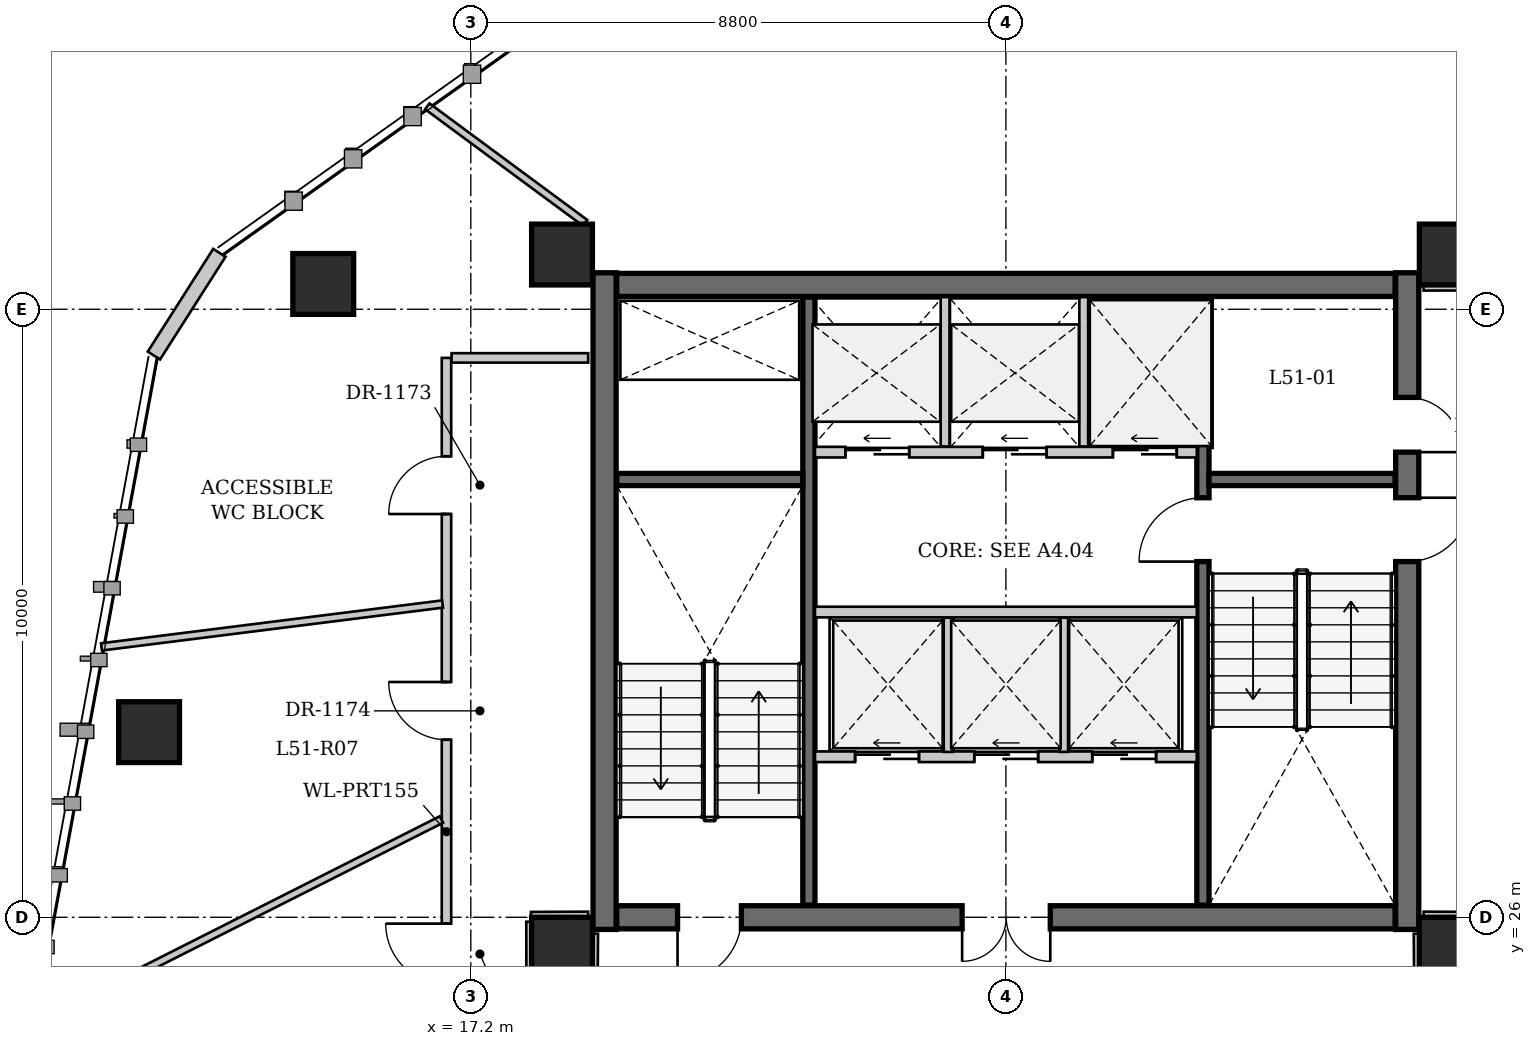
"""IFC4 building model, lengths in metres.
Left out: names, types, materials, properties, quantities, classifications, styles, units other than length and angle.
Written with IfcOpenShell. Run it as: python <this file> out.ifc"""

import sys

from ifc_helpers import new_model, si_unit, direction, frame, frame_2d, origin, origin_2d, place, context, subcontext, project, spatial, rectangle, extrude, source, transform, mapped, element, fill, save


model = new_model("IFC4")
c1 = context("Model", 3, precision=1e-05, world=origin(), true_north=direction((0.0, 1.0)))
c2 = subcontext(c1, "Body", "Model", "MODEL_VIEW")
j1 = project(units=[si_unit("LENGTHUNIT", "METRE"), si_unit("PLANEANGLEUNIT", "RADIAN")], contexts=[c1])
p1 = place(None, origin())
s1 = spatial("IfcSite", under=j1, at=p1, CompositionType="ELEMENT")
p2 = place(p1, origin())
s2 = spatial("IfcBuilding", under=s1, at=p2, CompositionType="ELEMENT")
p3 = place(p2, frame((0.0, 0.0, 195.0)))
s3 = spatial("IfcBuildingStorey", under=s2, at=p3, CompositionType="ELEMENT", Elevation=195.0)
for number, where, z_axis, x_axis in (
    (1, (11.909, 29.045, 0.0), (0.0, 0.0, 1.0), (1.0, 0.0, 0.0)),
    (2, (14.773, 36.416, 0.0), (0.0, 0.0, 1.0), (1.0, 0.0, 0.0)),
    (3, (18.7, 25.5, 0.0), (0.0, 0.0, 1.0), (1.0, 0.0, 0.0)),
    (4, (33.3, 25.5, 0.0), (0.0, 0.0, 1.0), (1.0, 0.0, 0.0)),
    (5, (33.3, 36.9, 0.0), (0.0, 0.0, 1.0), (1.0, 0.0, 0.0)),
    (6, (18.7, 36.9, 0.0), (0.0, 0.0, 1.0), (1.0, 0.0, 0.0)),
):
    element("IfcColumn", number, at=place(p3, frame(where, z_axis=z_axis, x_axis=x_axis)), inside=s3, PredefinedType="COLUMN", context=c2, shape_type="SweptSolid", body=[
        extrude(rectangle(XDim=1.0, YDim=1.0, at=origin_2d()), origin(), (0.0, 0.0, 1.0), 3.23),
    ])
p4 = place(p3, frame((11.989, 35.239, 0.0), z_axis=(0.0, 0.0, 1.0), x_axis=(0.537395915449, 0.843330083691, 0.0)))
e7 = element("IfcWall", 7, at=p4, inside=s3, PredefinedType="SOLIDWALL", context=c2, shape_type="SweptSolid", body=[
    extrude(rectangle(XDim=2.003, YDim=0.24, at=frame_2d((1.001, 0.0))), origin(), (0.0, 0.0, 1.0), 3.23),
])
p5 = place(p3, frame((19.4, 25.8, 0.0), z_axis=(0.0, 0.0, 1.0), x_axis=(0.0, 1.0, 0.0)))
e8 = element("IfcWall", 8, at=p5, inside=s3, PredefinedType="SHEAR", context=c2, shape_type="SweptSolid", body=[
    extrude(rectangle(XDim=10.8, YDim=0.38, at=frame_2d((5.4, 0.0))), origin(), (0.0, 0.0, 1.0), 3.5),
])
p6 = place(p3, frame((32.6, 36.6, 0.0), z_axis=(0.0, 0.0, 1.0), x_axis=(0.0, -1.0, 0.0)))
e9 = element("IfcWall", 9, at=p6, inside=s3, PredefinedType="SHEAR", context=c2, shape_type="SweptSolid", body=[
    extrude(rectangle(XDim=10.8, YDim=0.38, at=frame_2d((5.4, 0.0))), origin(), (0.0, 0.0, 1.0), 3.5),
])
p7 = place(p6, frame((3.7, 0.0, 0.0)))
e10 = element("IfcOpeningElement", 10, at=p7, cuts=e9, PredefinedType="OPENING", context=c2, shape_type="SweptSolid", body=[
    extrude(rectangle(XDim=1.05, YDim=2.15, at=frame_2d((0.525, 1.075))), frame((0.0, 0.2, 0.0), z_axis=(0.0, -1.0, 0.0), x_axis=(1.0, 0.0, 0.0)), (0.0, 0.0, 1.0), 0.4),
])
p8 = place(p6, frame((2.05, 0.0, 0.0)))
e11 = element("IfcOpeningElement", 11, at=p8, cuts=e9, PredefinedType="OPENING", context=c2, shape_type="SweptSolid", body=[
    extrude(rectangle(XDim=0.9, YDim=2.1, at=frame_2d((0.45, 1.05))), frame((0.0, 0.2, 0.0), z_axis=(0.0, -1.0, 0.0), x_axis=(1.0, 0.0, 0.0)), (0.0, 0.0, 1.0), 0.4),
])
p9 = place(p3, frame((19.6, 36.4, 0.0), z_axis=(0.0, 0.0, 1.0), x_axis=(1.0, 0.0, 0.0)))
e12 = element("IfcWall", 12, at=p9, inside=s3, PredefinedType="SHEAR", context=c2, shape_type="SweptSolid", body=[
    extrude(rectangle(XDim=12.8, YDim=0.38, at=frame_2d((6.4, 0.0))), origin(), (0.0, 0.0, 1.0), 3.5),
])
p10 = place(p3, frame((32.4, 26.0, 0.0), z_axis=(0.0, 0.0, 1.0), x_axis=(-1.0, 0.0, 0.0)))
e13 = element("IfcWall", 13, at=p10, inside=s3, PredefinedType="SHEAR", context=c2, shape_type="SweptSolid", body=[
    extrude(rectangle(XDim=12.8, YDim=0.38, at=frame_2d((6.4, 0.0))), origin(), (0.0, 0.0, 1.0), 3.5),
])
p11 = place(p10, frame((10.75, 0.0, 0.0)))
e14 = element("IfcOpeningElement", 14, at=p11, cuts=e13, PredefinedType="OPENING", context=c2, shape_type="SweptSolid", body=[
    extrude(rectangle(XDim=1.05, YDim=2.15, at=frame_2d((0.525, 1.075))), frame((0.0, 0.2, 0.0), z_axis=(0.0, -1.0, 0.0), x_axis=(1.0, 0.0, 0.0)), (0.0, 0.0, 1.0), 0.4),
])
p12 = place(p10, frame((5.67, 0.0, 0.0)))
e15 = element("IfcOpeningElement", 15, at=p12, cuts=e13, PredefinedType="OPENING", context=c2, shape_type="SweptSolid", body=[
    extrude(rectangle(XDim=1.45, YDim=2.2, at=frame_2d((0.725, 1.1))), frame((0.0, 0.2, 0.0), z_axis=(0.0, -1.0, 0.0), x_axis=(1.0, 0.0, 0.0)), (0.0, 0.0, 1.0), 0.4),
])
p13 = place(p3, frame((22.76, 26.2, 0.0), z_axis=(0.0, 0.0, 1.0), x_axis=(0.0, 1.0, 0.0)))
e16 = element("IfcWall", 16, at=p13, inside=s3, PredefinedType="SHEAR", context=c2, shape_type="SweptSolid", body=[
    extrude(rectangle(XDim=10.0, YDim=0.2, at=frame_2d((5.0, 0.0))), origin(), (0.0, 0.0, 1.0), 3.5),
])
p14 = place(p3, frame((29.24, 26.2, 0.0), z_axis=(0.0, 0.0, 1.0), x_axis=(0.0, 1.0, 0.0)))
e17 = element("IfcWall", 17, at=p14, inside=s3, PredefinedType="SHEAR", context=c2, shape_type="SweptSolid", body=[
    extrude(rectangle(XDim=10.0, YDim=0.2, at=frame_2d((5.0, 0.0))), origin(), (0.0, 0.0, 1.0), 3.5),
])
p15 = place(p14, frame((5.65, 0.0, 0.0)))
e18 = element("IfcOpeningElement", 18, at=p15, cuts=e17, PredefinedType="OPENING", context=c2, shape_type="SweptSolid", body=[
    extrude(rectangle(XDim=1.05, YDim=2.15, at=frame_2d((0.525, 1.075))), frame((0.0, 0.11, 0.0), z_axis=(0.0, -1.0, 0.0), x_axis=(1.0, 0.0, 0.0)), (0.0, 0.0, 1.0), 0.22),
])
for number, where, z_axis, x_axis in (
    (19, (19.6, 33.2, 0.0), (0.0, 0.0, 1.0), (1.0, 0.0, 0.0)),
    (20, (29.34, 33.2, 0.0), (0.0, 0.0, 1.0), (1.0, 0.0, 0.0)),
):
    element("IfcWall", number, at=place(p3, frame(where, z_axis=z_axis, x_axis=x_axis)), inside=s3, PredefinedType="SHEAR", context=c2, shape_type="SweptSolid", body=[
        extrude(rectangle(XDim=3.06, YDim=0.2, at=frame_2d((1.53, 0.0))), origin(), (0.0, 0.0, 1.0), 3.5),
    ])
p16 = place(p3, frame((22.86, 33.65, 0.0), z_axis=(0.0, 0.0, 1.0), x_axis=(1.0, 0.0, 0.0)))
e21 = element("IfcWall", 21, at=p16, inside=s3, PredefinedType="SOLIDWALL", context=c2, shape_type="SweptSolid", body=[
    extrude(rectangle(XDim=6.28, YDim=0.175, at=frame_2d((3.14, 0.0))), origin(), (0.0, 0.0, 1.0), 3.23),
])
p17 = place(p16, frame((0.5, 0.0, 0.0)))
e22 = element("IfcOpeningElement", 22, at=p17, cuts=e21, PredefinedType="OPENING", context=c2, shape_type="SweptSolid", body=[
    extrude(rectangle(XDim=1.05, YDim=2.15, at=frame_2d((0.525, 1.075))), frame((0.0, 0.098, 0.0), z_axis=(0.0, -1.0, 0.0), x_axis=(1.0, 0.0, 0.0)), (0.0, 0.0, 1.0), 0.195),
])
p18 = place(p16, frame((2.76, 0.0, 0.0)))
e23 = element("IfcOpeningElement", 23, at=p18, cuts=e21, PredefinedType="OPENING", context=c2, shape_type="SweptSolid", body=[
    extrude(rectangle(XDim=1.05, YDim=2.15, at=frame_2d((0.525, 1.075))), frame((0.0, 0.098, 0.0), z_axis=(0.0, -1.0, 0.0), x_axis=(1.0, 0.0, 0.0)), (0.0, 0.0, 1.0), 0.195),
])
p19 = place(p16, frame((4.9, 0.0, 0.0)))
e24 = element("IfcOpeningElement", 24, at=p19, cuts=e21, PredefinedType="OPENING", context=c2, shape_type="SweptSolid", body=[
    extrude(rectangle(XDim=1.05, YDim=2.15, at=frame_2d((0.525, 1.075))), frame((0.0, 0.098, 0.0), z_axis=(0.0, -1.0, 0.0), x_axis=(1.0, 0.0, 0.0)), (0.0, 0.0, 1.0), 0.195),
])
for number, where, z_axis, x_axis in (
    (25, (25.0, 33.743, 0.0), (0.0, 0.0, 1.0), (0.0, 1.0, 0.0)),
    (26, (27.28, 33.743, 0.0), (0.0, 0.0, 1.0), (0.0, 1.0, 0.0)),
):
    element("IfcWall", number, at=place(p3, frame(where, z_axis=z_axis, x_axis=x_axis)), inside=s3, PredefinedType="SOLIDWALL", context=c2, shape_type="SweptSolid", body=[
        extrude(rectangle(XDim=2.457, YDim=0.145, at=frame_2d((1.228, 0.0))), origin(), (0.0, 0.0, 1.0), 3.23),
    ])
p20 = place(p3, frame((22.86, 31.02, 0.0), z_axis=(0.0, 0.0, 1.0), x_axis=(1.0, 0.0, 0.0)))
e27 = element("IfcWall", 27, at=p20, inside=s3, PredefinedType="SOLIDWALL", context=c2, shape_type="SweptSolid", body=[
    extrude(rectangle(XDim=6.28, YDim=0.175, at=frame_2d((3.14, 0.0))), origin(), (0.0, 0.0, 1.0), 3.23),
])
p21 = place(p3, frame((22.86, 28.64, 0.0), z_axis=(0.0, 0.0, 1.0), x_axis=(1.0, 0.0, 0.0)))
e28 = element("IfcWall", 28, at=p21, inside=s3, PredefinedType="SOLIDWALL", context=c2, shape_type="SweptSolid", body=[
    extrude(rectangle(XDim=6.28, YDim=0.175, at=frame_2d((3.14, 0.0))), origin(), (0.0, 0.0, 1.0), 3.23),
])
p22 = place(p21, frame((0.66, 0.0, 0.0)))
e29 = element("IfcOpeningElement", 29, at=p22, cuts=e28, PredefinedType="OPENING", context=c2, shape_type="SweptSolid", body=[
    extrude(rectangle(XDim=1.05, YDim=2.15, at=frame_2d((0.525, 1.075))), frame((0.0, 0.098, 0.0), z_axis=(0.0, -1.0, 0.0), x_axis=(1.0, 0.0, 0.0)), (0.0, 0.0, 1.0), 0.195),
])
p23 = place(p21, frame((2.62, 0.0, 0.0)))
e30 = element("IfcOpeningElement", 30, at=p23, cuts=e28, PredefinedType="OPENING", context=c2, shape_type="SweptSolid", body=[
    extrude(rectangle(XDim=1.05, YDim=2.15, at=frame_2d((0.525, 1.075))), frame((0.0, 0.098, 0.0), z_axis=(0.0, -1.0, 0.0), x_axis=(1.0, 0.0, 0.0)), (0.0, 0.0, 1.0), 0.195),
])
p24 = place(p21, frame((4.56, 0.0, 0.0)))
e31 = element("IfcOpeningElement", 31, at=p24, cuts=e28, PredefinedType="OPENING", context=c2, shape_type="SweptSolid", body=[
    extrude(rectangle(XDim=1.05, YDim=2.15, at=frame_2d((0.525, 1.075))), frame((0.0, 0.098, 0.0), z_axis=(0.0, -1.0, 0.0), x_axis=(1.0, 0.0, 0.0)), (0.0, 0.0, 1.0), 0.195),
])
for number, where, z_axis, x_axis in (
    (32, (25.05, 28.72, 0.0), (0.0, 0.0, 1.0), (0.0, 1.0, 0.0)),
    (33, (26.95, 28.72, 0.0), (0.0, 0.0, 1.0), (0.0, 1.0, 0.0)),
):
    element("IfcWall", number, at=place(p3, frame(where, z_axis=z_axis, x_axis=x_axis)), inside=s3, PredefinedType="SOLIDWALL", context=c2, shape_type="SweptSolid", body=[
        extrude(rectangle(XDim=2.207, YDim=0.145, at=frame_2d((1.103, 0.0))), origin(), (0.0, 0.0, 1.0), 3.23),
    ])
p25 = place(p3, frame((16.8, 23.0, 0.0), z_axis=(0.0, 0.0, 1.0), x_axis=(0.0, 1.0, 0.0)))
e34 = element("IfcWall", 34, at=p25, inside=s3, PredefinedType="PARTITIONING", context=c2, shape_type="SweptSolid", body=[
    extrude(rectangle(XDim=12.2, YDim=0.155, at=frame_2d((6.1, 0.0))), origin(), (0.0, 0.0, 1.0), 3.23),
])
p26 = place(p25, frame((1.896, 0.0, 0.0)))
e35 = element("IfcOpeningElement", 35, at=p26, cuts=e34, PredefinedType="OPENING", context=c2, shape_type="SweptSolid", body=[
    extrude(rectangle(XDim=1.0, YDim=2.15, at=frame_2d((0.5, 1.075))), frame((0.0, 0.087, 0.0), z_axis=(0.0, -1.0, 0.0), x_axis=(1.0, 0.0, 0.0)), (0.0, 0.0, 1.0), 0.175),
])
p27 = place(p25, frame((9.632, 0.0, 0.0)))
e36 = element("IfcOpeningElement", 36, at=p27, cuts=e34, PredefinedType="OPENING", context=c2, shape_type="SweptSolid", body=[
    extrude(rectangle(XDim=0.95, YDim=2.15, at=frame_2d((0.475, 1.075))), frame((0.0, 0.087, 0.0), z_axis=(0.0, -1.0, 0.0), x_axis=(1.0, 0.0, 0.0)), (0.0, 0.0, 1.0), 0.175),
])
p28 = place(p25, frame((5.92, 0.0, 0.0)))
e37 = element("IfcOpeningElement", 37, at=p28, cuts=e34, PredefinedType="OPENING", context=c2, shape_type="SweptSolid", body=[
    extrude(rectangle(XDim=0.95, YDim=2.15, at=frame_2d((0.475, 1.075))), frame((0.0, 0.087, 0.0), z_axis=(0.0, -1.0, 0.0), x_axis=(1.0, 0.0, 0.0)), (0.0, 0.0, 1.0), 0.175),
])
p29 = place(p3, frame((16.884, 35.2, 0.0), z_axis=(0.0, 0.0, 1.0), x_axis=(1.0, 0.0, 0.0)))
e38 = element("IfcWall", 38, at=p29, inside=s3, PredefinedType="PARTITIONING", context=c2, shape_type="SweptSolid", body=[
    extrude(rectangle(XDim=2.246, YDim=0.155, at=frame_2d((1.123, 0.0))), origin(), (0.0, 0.0, 1.0), 3.23),
])
p30 = place(p3, frame((19.13, 26.015, 0.0), z_axis=(0.0, 0.0, 1.0), x_axis=(-0.99999026157, -0.004413248818, 0.0)))
e39 = element("IfcWall", 39, at=p30, inside=s3, PredefinedType="PARTITIONING", context=c2, shape_type="SweptSolid", body=[
    extrude(rectangle(XDim=0.94, YDim=0.155, at=frame_2d((0.47, 0.0))), origin(), (0.0, 0.0, 1.0), 3.23),
])
p31 = place(p3, frame((18.19, 25.927, 0.0), z_axis=(0.0, 0.0, 1.0), x_axis=(0.002078997586, -0.999997838882, 0.0)))
e40 = element("IfcWall", 40, at=p31, inside=s3, PredefinedType="PARTITIONING", context=c2, shape_type="SweptSolid", body=[
    extrude(rectangle(XDim=0.939, YDim=0.155, at=frame_2d((0.47, 0.0))), origin(), (0.0, 0.0, 1.0), 3.23),
])
p32 = place(p3, frame((19.21, 25.072, 0.0), z_axis=(0.0, 0.0, 1.0), x_axis=(0.007420945932, 0.999972464402, 0.0)))
e41 = element("IfcWall", 41, at=p32, inside=s3, PredefinedType="PARTITIONING", context=c2, shape_type="SweptSolid", body=[
    extrude(rectangle(XDim=0.658, YDim=0.155, at=frame_2d((0.329, 0.0))), origin(), (0.0, 0.0, 1.0), 3.23),
])
p33 = place(p3, frame((32.785, 25.73, 0.0), z_axis=(0.0, 0.0, 1.0), x_axis=(0.007570553288, -0.999971342951, 0.0)))
e42 = element("IfcWall", 42, at=p33, inside=s3, PredefinedType="PARTITIONING", context=c2, shape_type="SweptSolid", body=[
    extrude(rectangle(XDim=0.742, YDim=0.155, at=frame_2d((0.371, 0.0))), origin(), (0.0, 0.0, 1.0), 3.23),
])
p34 = place(p3, frame((33.727, 26.011, 0.0), z_axis=(0.0, 0.0, 1.0), x_axis=(-0.999990868706, 0.004273465251, 0.0)))
e43 = element("IfcWall", 43, at=p34, inside=s3, PredefinedType="PARTITIONING", context=c2, shape_type="SweptSolid", body=[
    extrude(rectangle(XDim=0.857, YDim=0.155, at=frame_2d((0.428, 0.0))), origin(), (0.0, 0.0, 1.0), 3.23),
])
p35 = place(p3, frame((32.87, 36.385, 0.0), z_axis=(0.0, 0.0, 1.0), x_axis=(0.999999965754, 0.000261711585, 0.0)))
e44 = element("IfcWall", 44, at=p35, inside=s3, PredefinedType="PARTITIONING", context=c2, shape_type="SweptSolid", body=[
    extrude(rectangle(XDim=0.933, YDim=0.155, at=frame_2d((0.466, 0.0))), origin(), (0.0, 0.0, 1.0), 3.23),
])
p36 = place(p3, frame((9.972, 24.2, 0.0), z_axis=(0.0, 0.0, 1.0), x_axis=(0.892532461232, 0.450983154504, 0.0)))
e45 = element("IfcWall", 45, at=p36, inside=s3, PredefinedType="PARTITIONING", context=c2, shape_type="SweptSolid", body=[
    extrude(rectangle(XDim=7.557, YDim=0.12, at=frame_2d((3.778, 0.0))), origin(), (0.0, 0.0, 1.0), 3.23),
])
p37 = place(p3, frame((19.08, 37.42, 0.0), z_axis=(0.0, 0.0, 1.0), x_axis=(-0.80430976954, 0.594210227633, 0.0)))
e46 = element("IfcWall", 46, at=p37, inside=s3, PredefinedType="PARTITIONING", context=c2, shape_type="SweptSolid", body=[
    extrude(rectangle(XDim=3.227, YDim=0.12, at=frame_2d((1.614, 0.0))), origin(), (0.0, 0.0, 1.0), 3.23),
])
p38 = place(p3, frame((16.736, 31.152, 0.0), z_axis=(0.0, 0.0, 1.0), x_axis=(-0.992197947241, -0.124672504948, 0.0)))
e47 = element("IfcWall", 47, at=p38, inside=s3, PredefinedType="PARTITIONING", context=c2, shape_type="SweptSolid", body=[
    extrude(rectangle(XDim=5.654, YDim=0.12, at=frame_2d((2.827, 0.0))), origin(), (0.0, 0.0, 1.0), 3.23),
])
m1 = source(origin(), c2, "Body", "SweptSolid", [
    extrude(rectangle(XDim=1.05, YDim=2.15, at=frame_2d((0.525, 1.075))), frame((0.0, 0.025, 0.0), z_axis=(0.0, -1.0, 0.0), x_axis=(1.0, 0.0, 0.0)), (0.0, 0.0, 1.0), 0.05),
])
p39 = place(p11, origin())
e48 = element("IfcDoor", 48, at=p39, inside=s3, OperationType="SINGLE_SWING_RIGHT", PredefinedType="DOOR", context=c2, shape_type="MappedRepresentation", body=[
    mapped(m1, transform((0.0, 0.0, 0.0), x_axis=(1.0, 0.0, 0.0), y_axis=(0.0, 1.0, 0.0), z_axis=(0.0, 0.0, 1.0), scale=1.0)),
])
fill(e14, e48)
m2 = source(origin(), c2, "Body", "SweptSolid", [
    extrude(rectangle(XDim=1.45, YDim=2.2, at=frame_2d((0.725, 1.1))), frame((0.0, 0.025, 0.0), z_axis=(0.0, -1.0, 0.0), x_axis=(1.0, 0.0, 0.0)), (0.0, 0.0, 1.0), 0.05),
])
p40 = place(p12, origin())
e49 = element("IfcDoor", 49, at=p40, inside=s3, OperationType="DOUBLE_DOOR_SINGLE_SWING", PredefinedType="DOOR", context=c2, shape_type="MappedRepresentation", body=[
    mapped(m2, transform((0.0, 0.0, 0.0), x_axis=(1.0, 0.0, 0.0), y_axis=(0.0, 1.0, 0.0), z_axis=(0.0, 0.0, 1.0), scale=1.0)),
])
fill(e15, e49)
p41 = place(p7, origin())
e50 = element("IfcDoor", 50, at=p41, inside=s3, OperationType="SINGLE_SWING_LEFT", PredefinedType="DOOR", context=c2, shape_type="MappedRepresentation", body=[
    mapped(m1, transform((0.0, 0.0, 0.0), x_axis=(1.0, 0.0, 0.0), y_axis=(0.0, 1.0, 0.0), z_axis=(0.0, 0.0, 1.0), scale=1.0)),
])
fill(e10, e50)
p42 = place(p15, origin())
e51 = element("IfcDoor", 51, at=p42, inside=s3, OperationType="SINGLE_SWING_LEFT", PredefinedType="DOOR", context=c2, shape_type="MappedRepresentation", body=[
    mapped(m1, transform((0.0, 0.0, 0.0), x_axis=(1.0, 0.0, 0.0), y_axis=(0.0, 1.0, 0.0), z_axis=(0.0, 0.0, 1.0), scale=1.0)),
])
fill(e18, e51)
m3 = source(origin(), c2, "Body", "SweptSolid", [
    extrude(rectangle(XDim=1.05, YDim=2.15, at=frame_2d((0.525, 1.075))), frame((0.0, 0.025, 0.0), z_axis=(0.0, -1.0, 0.0), x_axis=(1.0, 0.0, 0.0)), (0.0, 0.0, 1.0), 0.05),
])
p43 = place(p17, origin())
e52 = element("IfcDoor", 52, at=p43, inside=s3, OperationType="SLIDING_TO_LEFT", PredefinedType="DOOR", context=c2, shape_type="MappedRepresentation", body=[
    mapped(m3, transform((0.0, 0.0, 0.0), x_axis=(1.0, 0.0, 0.0), y_axis=(0.0, 1.0, 0.0), z_axis=(0.0, 0.0, 1.0), scale=1.0)),
])
fill(e22, e52)
p44 = place(p18, origin())
e53 = element("IfcDoor", 53, at=p44, inside=s3, OperationType="SLIDING_TO_LEFT", PredefinedType="DOOR", context=c2, shape_type="MappedRepresentation", body=[
    mapped(m3, transform((0.0, 0.0, 0.0), x_axis=(1.0, 0.0, 0.0), y_axis=(0.0, 1.0, 0.0), z_axis=(0.0, 0.0, 1.0), scale=1.0)),
])
fill(e23, e53)
p45 = place(p19, origin())
e54 = element("IfcDoor", 54, at=p45, inside=s3, OperationType="SLIDING_TO_LEFT", PredefinedType="DOOR", context=c2, shape_type="MappedRepresentation", body=[
    mapped(m3, transform((0.0, 0.0, 0.0), x_axis=(1.0, 0.0, 0.0), y_axis=(0.0, 1.0, 0.0), z_axis=(0.0, 0.0, 1.0), scale=1.0)),
])
fill(e24, e54)
p46 = place(p22, origin())
e55 = element("IfcDoor", 55, at=p46, inside=s3, OperationType="SLIDING_TO_LEFT", PredefinedType="DOOR", context=c2, shape_type="MappedRepresentation", body=[
    mapped(m3, transform((0.0, 0.0, 0.0), x_axis=(1.0, 0.0, 0.0), y_axis=(0.0, 1.0, 0.0), z_axis=(0.0, 0.0, 1.0), scale=1.0)),
])
fill(e29, e55)
p47 = place(p23, origin())
e56 = element("IfcDoor", 56, at=p47, inside=s3, OperationType="SLIDING_TO_LEFT", PredefinedType="DOOR", context=c2, shape_type="MappedRepresentation", body=[
    mapped(m3, transform((0.0, 0.0, 0.0), x_axis=(1.0, 0.0, 0.0), y_axis=(0.0, 1.0, 0.0), z_axis=(0.0, 0.0, 1.0), scale=1.0)),
])
fill(e30, e56)
p48 = place(p24, origin())
e57 = element("IfcDoor", 57, at=p48, inside=s3, OperationType="SLIDING_TO_LEFT", PredefinedType="DOOR", context=c2, shape_type="MappedRepresentation", body=[
    mapped(m3, transform((0.0, 0.0, 0.0), x_axis=(1.0, 0.0, 0.0), y_axis=(0.0, 1.0, 0.0), z_axis=(0.0, 0.0, 1.0), scale=1.0)),
])
fill(e31, e57)
m4 = source(origin(), c2, "Body", "SweptSolid", [
    extrude(rectangle(XDim=0.9, YDim=2.1, at=frame_2d((0.45, 1.05))), frame((0.0, 0.025, 0.0), z_axis=(0.0, -1.0, 0.0), x_axis=(1.0, 0.0, 0.0)), (0.0, 0.0, 1.0), 0.05),
])
p49 = place(p8, origin())
e58 = element("IfcDoor", 58, at=p49, inside=s3, OperationType="SINGLE_SWING_RIGHT", PredefinedType="DOOR", context=c2, shape_type="MappedRepresentation", body=[
    mapped(m4, transform((0.0, 0.0, 0.0), x_axis=(1.0, 0.0, 0.0), y_axis=(0.0, 1.0, 0.0), z_axis=(0.0, 0.0, 1.0), scale=1.0)),
])
fill(e11, e58)
m5 = source(origin(), c2, "Body", "SweptSolid", [
    extrude(rectangle(XDim=1.0, YDim=2.15, at=frame_2d((0.5, 1.075))), frame((0.0, 0.025, 0.0), z_axis=(0.0, -1.0, 0.0), x_axis=(1.0, 0.0, 0.0)), (0.0, 0.0, 1.0), 0.05),
])
p50 = place(p26, origin())
e59 = element("IfcDoor", 59, at=p50, inside=s3, OperationType="SINGLE_SWING_RIGHT", PredefinedType="DOOR", context=c2, shape_type="MappedRepresentation", body=[
    mapped(m5, transform((0.0, 0.0, 0.0), x_axis=(1.0, 0.0, 0.0), y_axis=(0.0, 1.0, 0.0), z_axis=(0.0, 0.0, 1.0), scale=1.0)),
])
fill(e35, e59)
m6 = source(origin(), c2, "Body", "SweptSolid", [
    extrude(rectangle(XDim=0.95, YDim=2.15, at=frame_2d((0.475, 1.075))), frame((0.0, 0.025, 0.0), z_axis=(0.0, -1.0, 0.0), x_axis=(1.0, 0.0, 0.0)), (0.0, 0.0, 1.0), 0.05),
])
p51 = place(p27, origin())
e60 = element("IfcDoor", 60, at=p51, inside=s3, OperationType="SINGLE_SWING_LEFT", PredefinedType="DOOR", context=c2, shape_type="MappedRepresentation", body=[
    mapped(m6, transform((0.0, 0.0, 0.0), x_axis=(1.0, 0.0, 0.0), y_axis=(0.0, 1.0, 0.0), z_axis=(0.0, 0.0, 1.0), scale=1.0)),
])
fill(e36, e60)
p52 = place(p28, origin())
e61 = element("IfcDoor", 61, at=p52, inside=s3, OperationType="SINGLE_SWING_RIGHT", PredefinedType="DOOR", context=c2, shape_type="MappedRepresentation", body=[
    mapped(m6, transform((0.0, 0.0, 0.0), x_axis=(1.0, 0.0, 0.0), y_axis=(0.0, 1.0, 0.0), z_axis=(0.0, 0.0, 1.0), scale=1.0)),
])
fill(e37, e61)
save(model, sys.argv[1])
